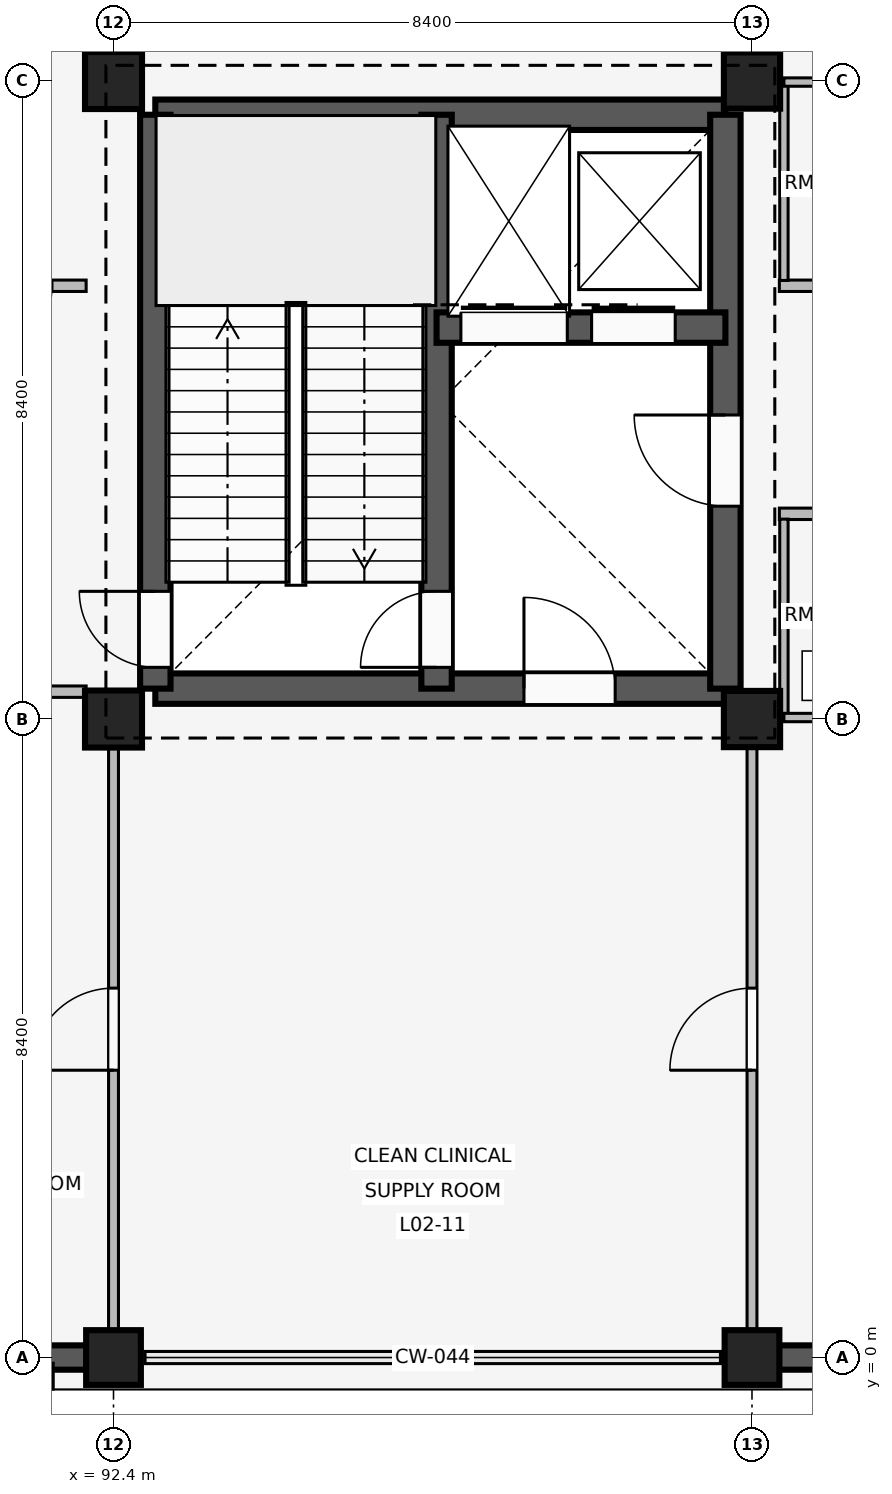
"""IFC4 building model, lengths in metres.
Left out: names, types, materials, properties, quantities, classifications, styles, units other than length and angle.
Written with IfcOpenShell. Run it as: python <this file> out.ifc"""

import sys

from ifc_helpers import new_model, si_unit, direction, frame, frame_2d, origin, origin_2d, place, context, subcontext, project, spatial, rectangle, extrude, element, fill, save


model = new_model("IFC4")
c1 = context("Model", 3, precision=1e-05, world=origin(), true_north=direction((0.0, 1.0)))
c2 = subcontext(c1, "Body", "Model", "MODEL_VIEW")
j1 = project(units=[si_unit("LENGTHUNIT", "METRE"), si_unit("PLANEANGLEUNIT", "RADIAN")], contexts=[c1])
p1 = place(None, origin())
s1 = spatial("IfcSite", under=j1, at=p1, CompositionType="ELEMENT")
p2 = place(p1, origin())
s2 = spatial("IfcBuilding", under=s1, at=p2, CompositionType="ELEMENT")
p3 = place(p2, frame((0.0, 0.0, 8.1)))
s3 = spatial("IfcBuildingStorey", under=s2, at=p3, CompositionType="ELEMENT", Elevation=8.1)
p4 = place(p3, frame((92.4, 0.0, 0.0), z_axis=(0.0, 0.0, 1.0), x_axis=(1.0, 0.0, 0.0)))
e1 = element("IfcColumn", 1, at=p4, inside=s3, PredefinedType="COLUMN", context=c2, shape_type="SweptSolid", body=[
    extrude(rectangle(XDim=0.72, YDim=0.72, at=origin_2d()), origin(), (0.0, 0.0, 1.0), 4.8),
])
for number, where, z_axis, x_axis in (
    (2, (92.4, 8.4, 0.0), (0.0, 0.0, 1.0), (1.0, 0.0, 0.0)),
    (3, (92.4, 16.8, 0.0), (0.0, 0.0, 1.0), (1.0, 0.0, 0.0)),
):
    element("IfcColumn", number, at=place(p3, frame(where, z_axis=z_axis, x_axis=x_axis)), inside=s3, PredefinedType="COLUMN", context=c2, shape_type="SweptSolid", body=[
        extrude(rectangle(XDim=0.75, YDim=0.75, at=origin_2d()), origin(), (0.0, 0.0, 1.0), 4.8),
    ])
p5 = place(p3, frame((100.8, 0.0, 0.0), z_axis=(0.0, 0.0, 1.0), x_axis=(1.0, 0.0, 0.0)))
e4 = element("IfcColumn", 4, at=p5, inside=s3, PredefinedType="COLUMN", context=c2, shape_type="SweptSolid", body=[
    extrude(rectangle(XDim=0.72, YDim=0.72, at=origin_2d()), origin(), (0.0, 0.0, 1.0), 4.8),
])
for number, where, z_axis, x_axis in (
    (5, (100.8, 8.4, 0.0), (0.0, 0.0, 1.0), (1.0, 0.0, 0.0)),
    (6, (100.8, 16.8, 0.0), (0.0, 0.0, 1.0), (1.0, 0.0, 0.0)),
):
    element("IfcColumn", number, at=place(p3, frame(where, z_axis=z_axis, x_axis=x_axis)), inside=s3, PredefinedType="COLUMN", context=c2, shape_type="SweptSolid", body=[
        extrude(rectangle(XDim=0.74, YDim=0.74, at=origin_2d()), origin(), (0.0, 0.0, 1.0), 4.8),
    ])
p6 = place(p3, frame((92.045, 0.0, 0.0), z_axis=(0.0, 0.0, 1.0), x_axis=(-1.0, 0.0, 0.0)))
e7 = element("IfcWall", 7, at=p6, inside=s3, PredefinedType="SOLIDWALL", context=c2, shape_type="SweptSolid", body=[
    extrude(rectangle(XDim=7.69, YDim=0.32, at=frame_2d((3.845, 0.0))), origin(), (0.0, 0.0, 1.0), 3.86),
])
p7 = place(p6, frame((0.5, 0.0, 0.85)))
e8 = element("IfcOpeningElement", 8, at=p7, cuts=e7, PredefinedType="OPENING", context=c2, shape_type="SweptSolid", body=[
    extrude(rectangle(XDim=1.44, YDim=1.62, at=frame_2d((0.72, 0.81))), frame((0.0, 0.17, 0.0), z_axis=(0.0, -1.0, 0.0), x_axis=(1.0, 0.0, 0.0)), (0.0, 0.0, 1.0), 0.34),
])
p8 = place(p6, frame((5.201, 0.0, 0.85)))
e9 = element("IfcOpeningElement", 9, at=p8, cuts=e7, PredefinedType="OPENING", context=c2, shape_type="SweptSolid", body=[
    extrude(rectangle(XDim=1.44, YDim=1.62, at=frame_2d((0.72, 0.81))), frame((0.0, 0.17, 0.0), z_axis=(0.0, -1.0, 0.0), x_axis=(1.0, 0.0, 0.0)), (0.0, 0.0, 1.0), 0.34),
])
p9 = place(p3, frame((91.507, -0.075, 0.0), z_axis=(0.0, 0.0, 1.0), x_axis=(0.0, -1.0, 0.0)))
e10 = element("IfcWall", 10, at=p9, inside=s3, PredefinedType="ELEMENTEDWALL", context=c2, shape_type="SweptSolid", body=[
    extrude(rectangle(XDim=0.34, YDim=0.2, at=frame_2d((0.17, 0.0))), origin(), (0.0, 0.0, 1.0), 3.84),
])
p10 = place(p3, frame((108.845, 0.0, 0.0), z_axis=(0.0, 0.0, 1.0), x_axis=(-1.0, 0.0, 0.0)))
e11 = element("IfcWall", 11, at=p10, inside=s3, PredefinedType="SOLIDWALL", context=c2, shape_type="SweptSolid", body=[
    extrude(rectangle(XDim=7.69, YDim=0.32, at=frame_2d((3.845, 0.0))), origin(), (0.0, 0.0, 1.0), 3.86),
])
p11 = place(p10, frame((1.139, 0.0, 0.85)))
e12 = element("IfcOpeningElement", 12, at=p11, cuts=e11, PredefinedType="OPENING", context=c2, shape_type="SweptSolid", body=[
    extrude(rectangle(XDim=1.26, YDim=1.52, at=frame_2d((0.63, 0.76))), frame((0.0, 0.17, 0.0), z_axis=(0.0, -1.0, 0.0), x_axis=(1.0, 0.0, 0.0)), (0.0, 0.0, 1.0), 0.34),
])
p12 = place(p10, frame((5.291, 0.0, 0.85)))
e13 = element("IfcOpeningElement", 13, at=p12, cuts=e11, PredefinedType="OPENING", context=c2, shape_type="SweptSolid", body=[
    extrude(rectangle(XDim=1.26, YDim=1.52, at=frame_2d((0.63, 0.76))), frame((0.0, 0.17, 0.0), z_axis=(0.0, -1.0, 0.0), x_axis=(1.0, 0.0, 0.0)), (0.0, 0.0, 1.0), 0.34),
])
p13 = place(p3, frame((92.95, 8.8, 0.0), z_axis=(0.0, 0.0, 1.0), x_axis=(1.0, 0.0, 0.0)))
e14 = element("IfcWall", 14, at=p13, inside=s3, PredefinedType="SHEAR", context=c2, shape_type="SweptSolid", body=[
    extrude(rectangle(XDim=7.5, YDim=0.4, at=frame_2d((3.75, 0.0))), origin(), (0.0, 0.0, 1.0), 4.52),
])
p14 = place(p13, frame((4.85, 0.0, 0.0)))
e15 = element("IfcOpeningElement", 15, at=p14, cuts=e14, PredefinedType="OPENING", context=c2, shape_type="SweptSolid", body=[
    extrude(rectangle(XDim=1.2, YDim=2.2, at=frame_2d((0.6, 1.1))), frame((0.0, 0.21, 0.0), z_axis=(0.0, -1.0, 0.0), x_axis=(1.0, 0.0, 0.0)), (0.0, 0.0, 1.0), 0.42),
])
p15 = place(p3, frame((92.95, 16.35, 0.0), z_axis=(0.0, 0.0, 1.0), x_axis=(1.0, 0.0, 0.0)))
e16 = element("IfcWall", 16, at=p15, inside=s3, PredefinedType="SHEAR", context=c2, shape_type="SweptSolid", body=[
    extrude(rectangle(XDim=7.5, YDim=0.4, at=frame_2d((3.75, 0.0))), origin(), (0.0, 0.0, 1.0), 4.52),
])
p16 = place(p3, frame((92.95, 8.8, 0.0), z_axis=(0.0, 0.0, 1.0), x_axis=(0.0, 1.0, 0.0)))
e17 = element("IfcWall", 17, at=p16, inside=s3, PredefinedType="SHEAR", context=c2, shape_type="SweptSolid", body=[
    extrude(rectangle(XDim=7.55, YDim=0.4, at=frame_2d((3.775, 0.0))), origin(), (0.0, 0.0, 1.0), 4.52),
])
p17 = place(p16, frame((0.28, 0.0, 0.0)))
e18 = element("IfcOpeningElement", 18, at=p17, cuts=e17, PredefinedType="OPENING", context=c2, shape_type="SweptSolid", body=[
    extrude(rectangle(XDim=1.0, YDim=2.15, at=frame_2d((0.5, 1.075))), frame((0.0, 0.21, 0.0), z_axis=(0.0, -1.0, 0.0), x_axis=(1.0, 0.0, 0.0)), (0.0, 0.0, 1.0), 0.42),
])
p18 = place(p3, frame((100.45, 8.8, 0.0), z_axis=(0.0, 0.0, 1.0), x_axis=(0.0, 1.0, 0.0)))
e19 = element("IfcWall", 19, at=p18, inside=s3, PredefinedType="SHEAR", context=c2, shape_type="SweptSolid", body=[
    extrude(rectangle(XDim=7.55, YDim=0.4, at=frame_2d((3.775, 0.0))), origin(), (0.0, 0.0, 1.0), 4.52),
])
p19 = place(p18, frame((2.4, 0.0, 0.0)))
e20 = element("IfcOpeningElement", 20, at=p19, cuts=e19, PredefinedType="OPENING", context=c2, shape_type="SweptSolid", body=[
    extrude(rectangle(XDim=1.2, YDim=2.2, at=frame_2d((0.6, 1.1))), frame((0.0, 0.21, 0.0), z_axis=(0.0, -1.0, 0.0), x_axis=(1.0, 0.0, 0.0)), (0.0, 0.0, 1.0), 0.42),
])
p20 = place(p3, frame((96.65, 8.8, 0.0), z_axis=(0.0, 0.0, 1.0), x_axis=(0.0, 1.0, 0.0)))
e21 = element("IfcWall", 21, at=p20, inside=s3, PredefinedType="SHEAR", context=c2, shape_type="SweptSolid", body=[
    extrude(rectangle(XDim=7.55, YDim=0.4, at=frame_2d((3.775, 0.0))), origin(), (0.0, 0.0, 1.0), 4.52),
])
p21 = place(p20, frame((0.28, 0.0, 0.0)))
e22 = element("IfcOpeningElement", 22, at=p21, cuts=e21, PredefinedType="OPENING", context=c2, shape_type="SweptSolid", body=[
    extrude(rectangle(XDim=1.0, YDim=2.15, at=frame_2d((0.5, 1.075))), frame((0.0, 0.21, 0.0), z_axis=(0.0, -1.0, 0.0), x_axis=(1.0, 0.0, 0.0)), (0.0, 0.0, 1.0), 0.42),
])
p22 = place(p3, frame((96.65, 13.55, 0.0), z_axis=(0.0, 0.0, 1.0), x_axis=(1.0, 0.0, 0.0)))
e23 = element("IfcWall", 23, at=p22, inside=s3, PredefinedType="SHEAR", context=c2, shape_type="SweptSolid", body=[
    extrude(rectangle(XDim=3.8, YDim=0.4, at=frame_2d((1.9, 0.0))), origin(), (0.0, 0.0, 1.0), 4.52),
])
p23 = place(p22, frame((0.32, 0.0, 0.0)))
e24 = element("IfcOpeningElement", 24, at=p23, cuts=e23, PredefinedType="OPENING", context=c2, shape_type="SweptSolid", body=[
    extrude(rectangle(XDim=1.4, YDim=2.25, at=frame_2d((0.7, 1.125))), frame((0.0, 0.21, 0.0), z_axis=(0.0, -1.0, 0.0), x_axis=(1.0, 0.0, 0.0)), (0.0, 0.0, 1.0), 0.42),
])
p24 = place(p22, frame((2.04, 0.0, 0.0)))
e25 = element("IfcOpeningElement", 25, at=p24, cuts=e23, PredefinedType="OPENING", context=c2, shape_type="SweptSolid", body=[
    extrude(rectangle(XDim=1.1, YDim=2.15, at=frame_2d((0.55, 1.075))), frame((0.0, 0.21, 0.0), z_axis=(0.0, -1.0, 0.0), x_axis=(1.0, 0.0, 0.0)), (0.0, 0.0, 1.0), 0.42),
])
p25 = place(p3, frame((89.86, 8.76, 0.0), z_axis=(0.0, 0.0, 1.0), x_axis=(1.0, 0.0, 0.0)))
e26 = element("IfcWall", 26, at=p25, inside=s3, PredefinedType="PARTITIONING", context=c2, shape_type="SweptSolid", body=[
    extrude(rectangle(XDim=2.18, YDim=0.15, at=frame_2d((1.09, 0.0))), origin(), (0.0, 0.0, 1.0), 3.84),
])
p26 = place(p25, frame((0.5, 0.0, 0.0)))
e27 = element("IfcOpeningElement", 27, at=p26, cuts=e26, PredefinedType="OPENING", context=c2, shape_type="SweptSolid", body=[
    extrude(rectangle(XDim=1.08, YDim=2.15, at=frame_2d((0.54, 1.075))), frame((0.0, 0.085, 0.0), z_axis=(0.0, -1.0, 0.0), x_axis=(1.0, 0.0, 0.0)), (0.0, 0.0, 1.0), 0.17),
])
p27 = place(p3, frame((92.04, 14.1, 0.0), z_axis=(0.0, 0.0, 1.0), x_axis=(-1.0, 0.0, 0.0)))
e28 = element("IfcWall", 28, at=p27, inside=s3, PredefinedType="PARTITIONING", context=c2, shape_type="SweptSolid", body=[
    extrude(rectangle(XDim=7.96, YDim=0.15, at=frame_2d((3.98, 0.0))), origin(), (0.0, 0.0, 1.0), 3.84),
])
p28 = place(p27, frame((0.45, 0.0, 0.0)))
e29 = element("IfcOpeningElement", 29, at=p28, cuts=e28, PredefinedType="OPENING", context=c2, shape_type="SweptSolid", body=[
    extrude(rectangle(XDim=1.3, YDim=2.25, at=frame_2d((0.65, 1.125))), frame((0.0, 0.085, 0.0), z_axis=(0.0, -1.0, 0.0), x_axis=(1.0, 0.0, 0.0)), (0.0, 0.0, 1.0), 0.17),
])
p29 = place(p27, frame((4.15, 0.0, 0.0)))
e30 = element("IfcOpeningElement", 30, at=p29, cuts=e28, PredefinedType="OPENING", context=c2, shape_type="SweptSolid", body=[
    extrude(rectangle(XDim=1.3, YDim=2.25, at=frame_2d((0.65, 1.125))), frame((0.0, 0.085, 0.0), z_axis=(0.0, -1.0, 0.0), x_axis=(1.0, 0.0, 0.0)), (0.0, 0.0, 1.0), 0.17),
])
p30 = place(p3, frame((92.4, 0.14, 0.0), z_axis=(0.0, 0.0, 1.0), x_axis=(0.0, 1.0, 0.0)))
e31 = element("IfcWall", 31, at=p30, inside=s3, PredefinedType="PARTITIONING", context=c2, shape_type="SweptSolid", body=[
    extrude(rectangle(XDim=8.21, YDim=0.13, at=frame_2d((4.105, 0.0))), origin(), (0.0, 0.0, 1.0), 3.84),
])
p31 = place(p30, frame((3.64, 0.0, 0.0)))
e32 = element("IfcOpeningElement", 32, at=p31, cuts=e31, PredefinedType="OPENING", context=c2, shape_type="SweptSolid", body=[
    extrude(rectangle(XDim=1.08, YDim=2.15, at=frame_2d((0.54, 1.075))), frame((0.0, 0.075, 0.0), z_axis=(0.0, -1.0, 0.0), x_axis=(1.0, 0.0, 0.0)), (0.0, 0.0, 1.0), 0.15),
])
p32 = place(p3, frame((92.4, 17.15, 0.0), z_axis=(0.0, 0.0, 1.0), x_axis=(0.0, 1.0, 0.0)))
e33 = element("IfcWall", 33, at=p32, inside=s3, PredefinedType="PARTITIONING", context=c2, shape_type="SweptSolid", body=[
    extrude(rectangle(XDim=7.91, YDim=0.13, at=frame_2d((3.955, 0.0))), origin(), (0.0, 0.0, 1.0), 3.84),
])
p33 = place(p32, frame((3.4, 0.0, 0.0)))
e34 = element("IfcOpeningElement", 34, at=p33, cuts=e33, PredefinedType="OPENING", context=c2, shape_type="SweptSolid", body=[
    extrude(rectangle(XDim=1.05, YDim=2.2, at=frame_2d((0.525, 1.1))), frame((0.0, 0.075, 0.0), z_axis=(0.0, -1.0, 0.0), x_axis=(1.0, 0.0, 0.0)), (0.0, 0.0, 1.0), 0.15),
])
p34 = place(p3, frame((100.8, 0.14, 0.0), z_axis=(0.0, 0.0, 1.0), x_axis=(0.0, 1.0, 0.0)))
e35 = element("IfcWall", 35, at=p34, inside=s3, PredefinedType="PARTITIONING", context=c2, shape_type="SweptSolid", body=[
    extrude(rectangle(XDim=8.21, YDim=0.13, at=frame_2d((4.105, 0.0))), origin(), (0.0, 0.0, 1.0), 3.84),
])
p35 = place(p34, frame((3.64, 0.0, 0.0)))
e36 = element("IfcOpeningElement", 36, at=p35, cuts=e35, PredefinedType="OPENING", context=c2, shape_type="SweptSolid", body=[
    extrude(rectangle(XDim=1.08, YDim=2.15, at=frame_2d((0.54, 1.075))), frame((0.0, 0.075, 0.0), z_axis=(0.0, -1.0, 0.0), x_axis=(1.0, 0.0, 0.0)), (0.0, 0.0, 1.0), 0.15),
])
p36 = place(p3, frame((100.8, 17.15, 0.0), z_axis=(0.0, 0.0, 1.0), x_axis=(0.0, 1.0, 0.0)))
e37 = element("IfcWall", 37, at=p36, inside=s3, PredefinedType="PARTITIONING", context=c2, shape_type="SweptSolid", body=[
    extrude(rectangle(XDim=7.91, YDim=0.13, at=frame_2d((3.955, 0.0))), origin(), (0.0, 0.0, 1.0), 3.84),
])
p37 = place(p36, frame((3.4, 0.0, 0.0)))
e38 = element("IfcOpeningElement", 38, at=p37, cuts=e37, PredefinedType="OPENING", context=c2, shape_type="SweptSolid", body=[
    extrude(rectangle(XDim=1.05, YDim=2.2, at=frame_2d((0.525, 1.1))), frame((0.0, 0.075, 0.0), z_axis=(0.0, -1.0, 0.0), x_axis=(1.0, 0.0, 0.0)), (0.0, 0.0, 1.0), 0.15),
])
p38 = place(p3, frame((101.16, 11.1, 0.0), z_axis=(0.0, 0.0, 1.0), x_axis=(1.0, 0.0, 0.0)))
e39 = element("IfcWall", 39, at=p38, inside=s3, PredefinedType="PARTITIONING", context=c2, shape_type="SweptSolid", body=[
    extrude(rectangle(XDim=7.96, YDim=0.15, at=frame_2d((3.98, 0.0))), origin(), (0.0, 0.0, 1.0), 3.84),
])
p39 = place(p38, frame((2.25, 0.0, 0.0)))
e40 = element("IfcOpeningElement", 40, at=p39, cuts=e39, PredefinedType="OPENING", context=c2, shape_type="SweptSolid", body=[
    extrude(rectangle(XDim=1.35, YDim=2.25, at=frame_2d((0.675, 1.125))), frame((0.0, 0.085, 0.0), z_axis=(0.0, -1.0, 0.0), x_axis=(1.0, 0.0, 0.0)), (0.0, 0.0, 1.0), 0.17),
])
p40 = place(p38, frame((5.95, 0.0, 0.0)))
e41 = element("IfcOpeningElement", 41, at=p40, cuts=e39, PredefinedType="OPENING", context=c2, shape_type="SweptSolid", body=[
    extrude(rectangle(XDim=1.35, YDim=2.25, at=frame_2d((0.675, 1.125))), frame((0.0, 0.085, 0.0), z_axis=(0.0, -1.0, 0.0), x_axis=(1.0, 0.0, 0.0)), (0.0, 0.0, 1.0), 0.17),
])
p41 = place(p3, frame((101.22, 8.42, 0.0), z_axis=(0.0, 0.0, 1.0), x_axis=(0.0, 1.0, 0.0)))
e42 = element("IfcWall", 42, at=p41, inside=s3, PredefinedType="PARTITIONING", context=c2, shape_type="SweptSolid", body=[
    extrude(rectangle(XDim=2.61, YDim=0.11, at=frame_2d((1.305, 0.0))), origin(), (0.0, 0.0, 1.0), 3.84),
])
p42 = place(p3, frame((101.22, 8.42, 0.0), z_axis=(0.0, 0.0, 1.0), x_axis=(1.0, 0.0, 0.0)))
e43 = element("IfcWall", 43, at=p42, inside=s3, PredefinedType="PARTITIONING", context=c2, shape_type="SweptSolid", body=[
    extrude(rectangle(XDim=1.98, YDim=0.11, at=frame_2d((0.99, 0.0))), origin(), (0.0, 0.0, 1.0), 3.84),
])
p43 = place(p42, frame((0.54, 0.0, 0.0)))
e44 = element("IfcOpeningElement", 44, at=p43, cuts=e43, PredefinedType="OPENING", context=c2, shape_type="SweptSolid", body=[
    extrude(rectangle(XDim=0.9, YDim=2.1, at=frame_2d((0.45, 1.05))), frame((0.0, 0.065, 0.0), z_axis=(0.0, -1.0, 0.0), x_axis=(1.0, 0.0, 0.0)), (0.0, 0.0, 1.0), 0.13),
])
p44 = place(p3, frame((109.12, 14.1, 0.0), z_axis=(0.0, 0.0, 1.0), x_axis=(-1.0, 0.0, 0.0)))
e45 = element("IfcWall", 45, at=p44, inside=s3, PredefinedType="PARTITIONING", context=c2, shape_type="SweptSolid", body=[
    extrude(rectangle(XDim=7.96, YDim=0.15, at=frame_2d((3.98, 0.0))), origin(), (0.0, 0.0, 1.0), 3.84),
])
p45 = place(p44, frame((0.73, 0.0, 0.0)))
e46 = element("IfcOpeningElement", 46, at=p45, cuts=e45, PredefinedType="OPENING", context=c2, shape_type="SweptSolid", body=[
    extrude(rectangle(XDim=1.3, YDim=2.25, at=frame_2d((0.65, 1.125))), frame((0.0, 0.085, 0.0), z_axis=(0.0, -1.0, 0.0), x_axis=(1.0, 0.0, 0.0)), (0.0, 0.0, 1.0), 0.17),
])
p46 = place(p44, frame((4.43, 0.0, 0.0)))
e47 = element("IfcOpeningElement", 47, at=p46, cuts=e45, PredefinedType="OPENING", context=c2, shape_type="SweptSolid", body=[
    extrude(rectangle(XDim=1.3, YDim=2.25, at=frame_2d((0.65, 1.125))), frame((0.0, 0.085, 0.0), z_axis=(0.0, -1.0, 0.0), x_axis=(1.0, 0.0, 0.0)), (0.0, 0.0, 1.0), 0.17),
])
p47 = place(p3, frame((101.22, 14.17, 0.0), z_axis=(0.0, 0.0, 1.0), x_axis=(0.0, 1.0, 0.0)))
e48 = element("IfcWall", 48, at=p47, inside=s3, PredefinedType="PARTITIONING", context=c2, shape_type="SweptSolid", body=[
    extrude(rectangle(XDim=2.61, YDim=0.11, at=frame_2d((1.305, 0.0))), origin(), (0.0, 0.0, 1.0), 3.84),
])
p48 = place(p3, frame((101.22, 16.78, 0.0), z_axis=(0.0, 0.0, 1.0), x_axis=(1.0, 0.0, 0.0)))
e49 = element("IfcWall", 49, at=p48, inside=s3, PredefinedType="PARTITIONING", context=c2, shape_type="SweptSolid", body=[
    extrude(rectangle(XDim=1.98, YDim=0.11, at=frame_2d((0.99, 0.0))), origin(), (0.0, 0.0, 1.0), 3.84),
])
p49 = place(p48, frame((0.54, 0.0, 0.0)))
e50 = element("IfcOpeningElement", 50, at=p49, cuts=e49, PredefinedType="OPENING", context=c2, shape_type="SweptSolid", body=[
    extrude(rectangle(XDim=0.9, YDim=2.1, at=frame_2d((0.45, 1.05))), frame((0.0, 0.065, 0.0), z_axis=(0.0, -1.0, 0.0), x_axis=(1.0, 0.0, 0.0)), (0.0, 0.0, 1.0), 0.13),
])
p50 = place(p19, origin())
e51 = element("IfcDoor", 51, at=p50, inside=s3, OperationType="SINGLE_SWING_RIGHT", PredefinedType="DOOR", context=c2, shape_type="SweptSolid", body=[
    extrude(rectangle(XDim=1.2, YDim=2.2, at=frame_2d((0.6, 1.1))), frame((0.0, 0.025, 0.0), z_axis=(0.0, -1.0, 0.0), x_axis=(1.0, 0.0, 0.0)), (0.0, 0.0, 1.0), 0.05),
])
fill(e20, e51)
p51 = place(p14, origin())
e52 = element("IfcDoor", 52, at=p51, inside=s3, OperationType="SINGLE_SWING_LEFT", PredefinedType="DOOR", context=c2, shape_type="SweptSolid", body=[
    extrude(rectangle(XDim=1.2, YDim=2.2, at=frame_2d((0.6, 1.1))), frame((0.0, 0.025, 0.0), z_axis=(0.0, -1.0, 0.0), x_axis=(1.0, 0.0, 0.0)), (0.0, 0.0, 1.0), 0.05),
])
fill(e15, e52)
p52 = place(p17, origin())
e53 = element("IfcDoor", 53, at=p52, inside=s3, OperationType="SINGLE_SWING_RIGHT", PredefinedType="DOOR", context=c2, shape_type="SweptSolid", body=[
    extrude(rectangle(XDim=1.0, YDim=2.15, at=frame_2d((0.5, 1.075))), frame((0.0, 0.025, 0.0), z_axis=(0.0, -1.0, 0.0), x_axis=(1.0, 0.0, 0.0)), (0.0, 0.0, 1.0), 0.05),
])
fill(e18, e53)
p53 = place(p21, origin())
e54 = element("IfcDoor", 54, at=p53, inside=s3, OperationType="SINGLE_SWING_LEFT", PredefinedType="DOOR", context=c2, shape_type="SweptSolid", body=[
    extrude(rectangle(XDim=1.0, YDim=2.15, at=frame_2d((0.5, 1.075))), frame((0.0, 0.025, 0.0), z_axis=(0.0, -1.0, 0.0), x_axis=(1.0, 0.0, 0.0)), (0.0, 0.0, 1.0), 0.05),
])
fill(e22, e54)
p54 = place(p23, origin())
e55 = element("IfcDoor", 55, at=p54, inside=s3, OperationType="SLIDING_TO_LEFT", PredefinedType="DOOR", context=c2, shape_type="SweptSolid", body=[
    extrude(rectangle(XDim=1.4, YDim=2.25, at=frame_2d((0.7, 1.125))), frame((0.0, 0.025, 0.0), z_axis=(0.0, -1.0, 0.0), x_axis=(1.0, 0.0, 0.0)), (0.0, 0.0, 1.0), 0.05),
])
fill(e24, e55)
p55 = place(p24, origin())
e56 = element("IfcDoor", 56, at=p55, inside=s3, OperationType="SLIDING_TO_LEFT", PredefinedType="DOOR", context=c2, shape_type="SweptSolid", body=[
    extrude(rectangle(XDim=1.1, YDim=2.15, at=frame_2d((0.55, 1.075))), frame((0.0, 0.025, 0.0), z_axis=(0.0, -1.0, 0.0), x_axis=(1.0, 0.0, 0.0)), (0.0, 0.0, 1.0), 0.05),
])
fill(e25, e56)
p56 = place(p31, origin())
e57 = element("IfcDoor", 57, at=p56, inside=s3, OperationType="SINGLE_SWING_LEFT", PredefinedType="DOOR", context=c2, shape_type="SweptSolid", body=[
    extrude(rectangle(XDim=1.08, YDim=2.15, at=frame_2d((0.54, 1.075))), frame((0.0, 0.025, 0.0), z_axis=(0.0, -1.0, 0.0), x_axis=(1.0, 0.0, 0.0)), (0.0, 0.0, 1.0), 0.05),
])
fill(e32, e57)
p57 = place(p35, origin())
e58 = element("IfcDoor", 58, at=p57, inside=s3, OperationType="SINGLE_SWING_LEFT", PredefinedType="DOOR", context=c2, shape_type="SweptSolid", body=[
    extrude(rectangle(XDim=1.08, YDim=2.15, at=frame_2d((0.54, 1.075))), frame((0.0, 0.025, 0.0), z_axis=(0.0, -1.0, 0.0), x_axis=(1.0, 0.0, 0.0)), (0.0, 0.0, 1.0), 0.05),
])
fill(e36, e58)
save(model, sys.argv[1])
